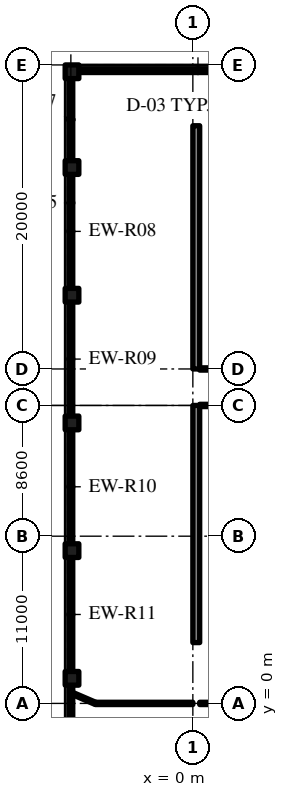
"""IFC4 building model, lengths in metres.
Left out: names, types, materials, properties, quantities, classifications, styles, units other than length and angle.
Written with IfcOpenShell. Run it as: python <this file> out.ifc"""

import sys

from ifc_helpers import new_model, si_unit, direction, frame, frame_2d, origin, origin_2d, place, context, subcontext, project, spatial, rectangle, extrude, source, transform, mapped, element, fill, save


model = new_model("IFC4")
c1 = context("Model", 3, precision=1e-05, world=origin(), true_north=direction((0.0, 1.0)))
c2 = subcontext(c1, "Body", "Model", "MODEL_VIEW")
j1 = project(units=[si_unit("LENGTHUNIT", "METRE"), si_unit("PLANEANGLEUNIT", "RADIAN")], contexts=[c1])
p1 = place(None, origin())
s1 = spatial("IfcSite", under=j1, at=p1, CompositionType="ELEMENT")
p2 = place(p1, origin())
s2 = spatial("IfcBuilding", under=s1, at=p2, CompositionType="ELEMENT")
p3 = place(p2, origin())
s3 = spatial("IfcBuildingStorey", under=s2, at=p3, CompositionType="ELEMENT", Elevation=0.0)
m1 = source(origin(), c2, "Body", "SweptSolid", [
    extrude(rectangle(XDim=15.6, YDim=0.45, at=frame_2d((7.8, 0.0))), origin(), (0.0, 0.0, 1.0), 5.72),
])
p4 = place(p3, frame((0.225, 4.0, 0.0), z_axis=(0.0, 0.0, 1.0), x_axis=(0.0, 1.0, 0.0)))
e1 = element("IfcWall", 1, at=p4, inside=s3, PredefinedType="SHEAR", context=c2, shape_type="MappedRepresentation", body=[
    mapped(m1, transform((0.0, 0.0, 0.0), scale=1.0)),
])
m2 = source(origin(), c2, "Body", "SweptSolid", [
    extrude(rectangle(XDim=16.0, YDim=0.45, at=frame_2d((8.0, 0.0))), origin(), (0.0, 0.0, 1.0), 5.72),
])
p5 = place(p3, frame((0.225, 22.0, 0.0), z_axis=(0.0, 0.0, 1.0), x_axis=(0.0, 1.0, 0.0)))
e2 = element("IfcWall", 2, at=p5, inside=s3, PredefinedType="SHEAR", context=c2, shape_type="MappedRepresentation", body=[
    mapped(m2, transform((0.0, 0.0, 0.0), scale=1.0)),
])
m3 = source(origin(), c2, "Body", "SweptSolid", [
    extrude(rectangle(XDim=0.9, YDim=0.9, at=origin_2d()), origin(), (0.0, 0.0, 1.0), 5.72),
])
for number, where, z_axis, x_axis in (
    (3, (-7.95, 1.65, 0.0), (0.0, 0.0, 1.0), (1.0, 0.0, 0.0)),
    (4, (-7.95, 10.05, 0.0), (0.0, 0.0, 1.0), (1.0, 0.0, 0.0)),
    (5, (-7.95, 18.45, 0.0), (0.0, 0.0, 1.0), (1.0, 0.0, 0.0)),
    (6, (-7.95, 26.85, 0.0), (0.0, 0.0, 1.0), (1.0, 0.0, 0.0)),
    (7, (-7.95, 35.25, 0.0), (0.0, 0.0, 1.0), (1.0, 0.0, 0.0)),
    (8, (-7.95, 41.55, 0.0), (0.0, 0.0, 1.0), (1.0, 0.0, 0.0)),
):
    element("IfcColumn", number, at=place(p3, frame(where, z_axis=z_axis, x_axis=x_axis)), inside=s3, PredefinedType="COLUMN", context=c2, shape_type="MappedRepresentation", body=[
        mapped(m3, transform((0.0, 0.0, 0.0), scale=1.0)),
    ])
m4 = source(origin(), c2, "Body", "SweptSolid", [
    extrude(rectangle(XDim=15.675, YDim=0.25, at=frame_2d((7.837, 0.0))), origin(), (0.0, 0.0, 1.0), 4.97),
])
p6 = place(p3, frame((8.175, 41.625, 0.0), z_axis=(0.0, 0.0, 1.0), x_axis=(-1.0, 0.0, 0.0)))
e9 = element("IfcWall", 9, at=p6, inside=s3, PredefinedType="SOLIDWALL", context=c2, shape_type="MappedRepresentation", body=[
    mapped(m4, transform((0.0, 0.0, 0.0), scale=1.0)),
])
m5 = source(origin(), c2, "Body", "SweptSolid", [
    extrude(rectangle(XDim=1.5, YDim=1.5, at=frame_2d((0.75, 0.75))), frame((0.0, 0.135, 0.0), z_axis=(0.0, -1.0, 0.0), x_axis=(1.0, 0.0, 0.0)), (0.0, 0.0, 1.0), 0.27),
])
p7 = place(p6, frame((1.209, 0.0, 0.9)))
e10 = element("IfcOpeningElement", 10, at=p7, cuts=e9, PredefinedType="OPENING", context=c2, shape_type="MappedRepresentation", body=[
    mapped(m5, transform((0.0, 0.0, 0.0), scale=1.0)),
])
p8 = place(p6, frame((5.128, 0.0, 0.9)))
e11 = element("IfcOpeningElement", 11, at=p8, cuts=e9, PredefinedType="OPENING", context=c2, shape_type="MappedRepresentation", body=[
    mapped(m5, transform((0.0, 0.0, 0.0), scale=1.0)),
])
p9 = place(p6, frame((9.047, 0.0, 0.9)))
e12 = element("IfcOpeningElement", 12, at=p9, cuts=e9, PredefinedType="OPENING", context=c2, shape_type="MappedRepresentation", body=[
    mapped(m5, transform((0.0, 0.0, 0.0), scale=1.0)),
])
p10 = place(p6, frame((12.966, 0.0, 0.9)))
e13 = element("IfcOpeningElement", 13, at=p10, cuts=e9, PredefinedType="OPENING", context=c2, shape_type="MappedRepresentation", body=[
    mapped(m5, transform((0.0, 0.0, 0.0), scale=1.0)),
])
m6 = source(origin(), c2, "Body", "SweptSolid", [
    extrude(rectangle(XDim=5.4, YDim=0.25, at=frame_2d((2.7, 0.0))), origin(), (0.0, 0.0, 1.0), 4.72),
])
p11 = place(p3, frame((-8.025, 41.1, 0.0), z_axis=(0.0, 0.0, 1.0), x_axis=(0.0, -1.0, 0.0)))
e14 = element("IfcWall", 14, at=p11, inside=s3, PredefinedType="SOLIDWALL", context=c2, shape_type="MappedRepresentation", body=[
    mapped(m6, transform((0.0, 0.0, 0.0), scale=1.0)),
])
m7 = source(origin(), c2, "Body", "SweptSolid", [
    extrude(rectangle(XDim=2.4, YDim=3.0, at=frame_2d((1.2, 1.5))), frame((0.0, 0.135, 0.0), z_axis=(0.0, -1.0, 0.0), x_axis=(1.0, 0.0, 0.0)), (0.0, 0.0, 1.0), 0.27),
])
p12 = place(p11, frame((1.5, 0.0, 0.2)))
e15 = element("IfcOpeningElement", 15, at=p12, cuts=e14, PredefinedType="OPENING", context=c2, shape_type="MappedRepresentation", body=[
    mapped(m7, transform((0.0, 0.0, 0.0), scale=1.0)),
])
m8 = source(origin(), c2, "Body", "SweptSolid", [
    extrude(rectangle(XDim=7.5, YDim=0.25, at=frame_2d((3.75, 0.0))), origin(), (0.0, 0.0, 1.0), 4.72),
])
p13 = place(p3, frame((-8.025, 34.8, 0.0), z_axis=(0.0, 0.0, 1.0), x_axis=(0.0, -1.0, 0.0)))
e16 = element("IfcWall", 16, at=p13, inside=s3, PredefinedType="SOLIDWALL", context=c2, shape_type="MappedRepresentation", body=[
    mapped(m8, transform((0.0, 0.0, 0.0), scale=1.0)),
])
p14 = place(p13, frame((0.675, 0.0, 0.2)))
e17 = element("IfcOpeningElement", 17, at=p14, cuts=e16, PredefinedType="OPENING", context=c2, shape_type="MappedRepresentation", body=[
    mapped(m7, transform((0.0, 0.0, 0.0), scale=1.0)),
])
p15 = place(p13, frame((4.425, 0.0, 0.2)))
e18 = element("IfcOpeningElement", 18, at=p15, cuts=e16, PredefinedType="OPENING", context=c2, shape_type="MappedRepresentation", body=[
    mapped(m7, transform((0.0, 0.0, 0.0), scale=1.0)),
])
p16 = place(p3, frame((-8.025, 26.4, 0.0), z_axis=(0.0, 0.0, 1.0), x_axis=(0.0, -1.0, 0.0)))
e19 = element("IfcWall", 19, at=p16, inside=s3, PredefinedType="SOLIDWALL", context=c2, shape_type="MappedRepresentation", body=[
    mapped(m8, transform((0.0, 0.0, 0.0), scale=1.0)),
])
p17 = place(p16, frame((0.675, 0.0, 0.2)))
e20 = element("IfcOpeningElement", 20, at=p17, cuts=e19, PredefinedType="OPENING", context=c2, shape_type="MappedRepresentation", body=[
    mapped(m7, transform((0.0, 0.0, 0.0), scale=1.0)),
])
p18 = place(p16, frame((4.425, 0.0, 0.2)))
e21 = element("IfcOpeningElement", 21, at=p18, cuts=e19, PredefinedType="OPENING", context=c2, shape_type="MappedRepresentation", body=[
    mapped(m7, transform((0.0, 0.0, 0.0), scale=1.0)),
])
p19 = place(p3, frame((-8.025, 18.0, 0.0), z_axis=(0.0, 0.0, 1.0), x_axis=(0.0, -1.0, 0.0)))
e22 = element("IfcWall", 22, at=p19, inside=s3, PredefinedType="SOLIDWALL", context=c2, shape_type="MappedRepresentation", body=[
    mapped(m8, transform((0.0, 0.0, 0.0), scale=1.0)),
])
p20 = place(p19, frame((0.675, 0.0, 0.2)))
e23 = element("IfcOpeningElement", 23, at=p20, cuts=e22, PredefinedType="OPENING", context=c2, shape_type="MappedRepresentation", body=[
    mapped(m7, transform((0.0, 0.0, 0.0), scale=1.0)),
])
p21 = place(p19, frame((4.425, 0.0, 0.2)))
e24 = element("IfcOpeningElement", 24, at=p21, cuts=e22, PredefinedType="OPENING", context=c2, shape_type="MappedRepresentation", body=[
    mapped(m7, transform((0.0, 0.0, 0.0), scale=1.0)),
])
p22 = place(p3, frame((-8.025, 9.6, 0.0), z_axis=(0.0, 0.0, 1.0), x_axis=(0.0, -1.0, 0.0)))
e25 = element("IfcWall", 25, at=p22, inside=s3, PredefinedType="SOLIDWALL", context=c2, shape_type="MappedRepresentation", body=[
    mapped(m8, transform((0.0, 0.0, 0.0), scale=1.0)),
])
p23 = place(p22, frame((0.675, 0.0, 0.2)))
e26 = element("IfcOpeningElement", 26, at=p23, cuts=e25, PredefinedType="OPENING", context=c2, shape_type="MappedRepresentation", body=[
    mapped(m7, transform((0.0, 0.0, 0.0), scale=1.0)),
])
p24 = place(p22, frame((4.425, 0.0, 0.2)))
e27 = element("IfcOpeningElement", 27, at=p24, cuts=e25, PredefinedType="OPENING", context=c2, shape_type="MappedRepresentation", body=[
    mapped(m7, transform((0.0, 0.0, 0.0), scale=1.0)),
])
p25 = place(p3, frame((-8.025, 1.2, 0.0), z_axis=(0.0, 0.0, 1.0), x_axis=(0.0, -1.0, 0.0)))
e28 = element("IfcWall", 28, at=p25, inside=s3, PredefinedType="SOLIDWALL", context=c2, shape_type="MappedRepresentation", body=[
    mapped(m8, transform((0.0, 0.0, 0.0), scale=1.0)),
])
p26 = place(p25, frame((0.675, 0.0, 0.2)))
e29 = element("IfcOpeningElement", 29, at=p26, cuts=e28, PredefinedType="OPENING", context=c2, shape_type="MappedRepresentation", body=[
    mapped(m7, transform((0.0, 0.0, 0.0), scale=1.0)),
])
p27 = place(p25, frame((4.425, 0.0, 0.2)))
e30 = element("IfcOpeningElement", 30, at=p27, cuts=e28, PredefinedType="OPENING", context=c2, shape_type="MappedRepresentation", body=[
    mapped(m7, transform((0.0, 0.0, 0.0), scale=1.0)),
])
m9 = source(origin(), c2, "Body", "SweptSolid", [
    extrude(rectangle(XDim=7.725, YDim=0.15, at=frame_2d((3.863, 0.0))), origin(), (0.0, 0.0, 1.0), 5.02),
])
p28 = place(p3, frame((0.45, 19.6, 0.0), z_axis=(0.0, 0.0, 1.0), x_axis=(1.0, 0.0, 0.0)))
e31 = element("IfcWall", 31, at=p28, inside=s3, PredefinedType="PARTITIONING", context=c2, shape_type="MappedRepresentation", body=[
    mapped(m9, transform((0.0, 0.0, 0.0), scale=1.0)),
])
m10 = source(origin(), c2, "Body", "SweptSolid", [
    extrude(rectangle(XDim=1.8, YDim=2.1, at=frame_2d((0.9, 1.05))), frame((0.0, 0.085, 0.0), z_axis=(0.0, -1.0, 0.0), x_axis=(1.0, 0.0, 0.0)), (0.0, 0.0, 1.0), 0.17),
])
p29 = place(p28, frame((2.962, 0.0, 0.0)))
e32 = element("IfcOpeningElement", 32, at=p29, cuts=e31, PredefinedType="OPENING", context=c2, shape_type="MappedRepresentation", body=[
    mapped(m10, transform((0.0, 0.0, 0.0), scale=1.0)),
])
m11 = source(origin(), c2, "Body", "SweptSolid", [
    extrude(rectangle(XDim=7.725, YDim=0.15, at=frame_2d((3.863, 0.0))), origin(), (0.0, 0.0, 1.0), 5.72),
])
p30 = place(p3, frame((0.45, 0.0, 0.0), z_axis=(0.0, 0.0, 1.0), x_axis=(1.0, 0.0, 0.0)))
e33 = element("IfcWall", 33, at=p30, inside=s3, PredefinedType="PARTITIONING", context=c2, shape_type="MappedRepresentation", body=[
    mapped(m11, transform((0.0, 0.0, 0.0), scale=1.0)),
])
m12 = source(origin(), c2, "Body", "SweptSolid", [
    extrude(rectangle(XDim=6.4, YDim=0.15, at=frame_2d((3.2, 0.0))), origin(), (0.0, 0.0, 1.0), 5.72),
])
p31 = place(p3, frame((-6.4, 0.0, 0.0), z_axis=(0.0, 0.0, 1.0), x_axis=(1.0, 0.0, 0.0)))
e34 = element("IfcWall", 34, at=p31, inside=s3, PredefinedType="PARTITIONING", context=c2, shape_type="MappedRepresentation", body=[
    mapped(m12, transform((0.0, 0.0, 0.0), scale=1.0)),
])
p32 = place(p3, frame((0.45, 22.0, 0.0), z_axis=(0.0, 0.0, 1.0), x_axis=(1.0, 0.0, 0.0)))
e35 = element("IfcWall", 35, at=p32, inside=s3, PredefinedType="PARTITIONING", context=c2, shape_type="MappedRepresentation", body=[
    mapped(m9, transform((0.0, 0.0, 0.0), scale=1.0)),
])
p33 = place(p32, frame((2.962, 0.0, 0.0)))
e36 = element("IfcOpeningElement", 36, at=p33, cuts=e35, PredefinedType="OPENING", context=c2, shape_type="MappedRepresentation", body=[
    mapped(m10, transform((0.0, 0.0, 0.0), scale=1.0)),
])
m13 = source(origin(), c2, "Body", "SweptSolid", [
    extrude(rectangle(XDim=1.633, YDim=0.15, at=frame_2d((0.816, 0.0))), origin(), (0.0, 0.0, 1.0), 5.72),
])
p34 = place(p3, frame((-7.9, 0.645, 0.0), z_axis=(0.0, 0.0, 1.0), x_axis=(0.918664846596, -0.395037845818, 0.0)))
e37 = element("IfcWall", 37, at=p34, inside=s3, PredefinedType="PARTITIONING", context=c2, shape_type="MappedRepresentation", body=[
    mapped(m13, transform((0.0, 0.0, 0.0), scale=1.0)),
])
m14 = source(origin(), c2, "Body", "SweptSolid", [
    extrude(rectangle(XDim=1.5, YDim=1.5, at=frame_2d((0.75, 0.75))), frame((0.0, 0.03, 0.0), z_axis=(0.0, -1.0, 0.0), x_axis=(1.0, 0.0, 0.0)), (0.0, 0.0, 1.0), 0.06),
])
p35 = place(p9, origin())
e38 = element("IfcWindow", 38, at=p35, inside=s3, PartitioningType="SINGLE_PANEL", PredefinedType="WINDOW", context=c2, shape_type="MappedRepresentation", body=[
    mapped(m14, transform((0.0, 0.0, 0.0), scale=1.0)),
])
fill(e12, e38)
p36 = place(p10, origin())
e39 = element("IfcWindow", 39, at=p36, inside=s3, PartitioningType="SINGLE_PANEL", PredefinedType="WINDOW", context=c2, shape_type="MappedRepresentation", body=[
    mapped(m14, transform((0.0, 0.0, 0.0), scale=1.0)),
])
fill(e13, e39)
m15 = source(origin(), c2, "Body", "SweptSolid", [
    extrude(rectangle(XDim=2.4, YDim=3.0, at=frame_2d((1.2, 1.5))), frame((0.0, 0.03, 0.0), z_axis=(0.0, -1.0, 0.0), x_axis=(1.0, 0.0, 0.0)), (0.0, 0.0, 1.0), 0.06),
])
p37 = place(p12, origin())
e40 = element("IfcWindow", 40, at=p37, inside=s3, PartitioningType="SINGLE_PANEL", PredefinedType="WINDOW", context=c2, shape_type="MappedRepresentation", body=[
    mapped(m15, transform((0.0, 0.0, 0.0), scale=1.0)),
])
fill(e15, e40)
p38 = place(p14, origin())
e41 = element("IfcWindow", 41, at=p38, inside=s3, PartitioningType="SINGLE_PANEL", PredefinedType="WINDOW", context=c2, shape_type="MappedRepresentation", body=[
    mapped(m15, transform((0.0, 0.0, 0.0), scale=1.0)),
])
fill(e17, e41)
p39 = place(p15, origin())
e42 = element("IfcWindow", 42, at=p39, inside=s3, PartitioningType="SINGLE_PANEL", PredefinedType="WINDOW", context=c2, shape_type="MappedRepresentation", body=[
    mapped(m15, transform((0.0, 0.0, 0.0), scale=1.0)),
])
fill(e18, e42)
p40 = place(p17, origin())
e43 = element("IfcWindow", 43, at=p40, inside=s3, PartitioningType="SINGLE_PANEL", PredefinedType="WINDOW", context=c2, shape_type="MappedRepresentation", body=[
    mapped(m15, transform((0.0, 0.0, 0.0), scale=1.0)),
])
fill(e20, e43)
p41 = place(p18, origin())
e44 = element("IfcWindow", 44, at=p41, inside=s3, PartitioningType="SINGLE_PANEL", PredefinedType="WINDOW", context=c2, shape_type="MappedRepresentation", body=[
    mapped(m15, transform((0.0, 0.0, 0.0), scale=1.0)),
])
fill(e21, e44)
p42 = place(p20, origin())
e45 = element("IfcWindow", 45, at=p42, inside=s3, PartitioningType="SINGLE_PANEL", PredefinedType="WINDOW", context=c2, shape_type="MappedRepresentation", body=[
    mapped(m15, transform((0.0, 0.0, 0.0), scale=1.0)),
])
fill(e23, e45)
p43 = place(p21, origin())
e46 = element("IfcWindow", 46, at=p43, inside=s3, PartitioningType="SINGLE_PANEL", PredefinedType="WINDOW", context=c2, shape_type="MappedRepresentation", body=[
    mapped(m15, transform((0.0, 0.0, 0.0), scale=1.0)),
])
fill(e24, e46)
p44 = place(p23, origin())
e47 = element("IfcWindow", 47, at=p44, inside=s3, PartitioningType="SINGLE_PANEL", PredefinedType="WINDOW", context=c2, shape_type="MappedRepresentation", body=[
    mapped(m15, transform((0.0, 0.0, 0.0), scale=1.0)),
])
fill(e26, e47)
p45 = place(p24, origin())
e48 = element("IfcWindow", 48, at=p45, inside=s3, PartitioningType="SINGLE_PANEL", PredefinedType="WINDOW", context=c2, shape_type="MappedRepresentation", body=[
    mapped(m15, transform((0.0, 0.0, 0.0), scale=1.0)),
])
fill(e27, e48)
p46 = place(p26, origin())
e49 = element("IfcWindow", 49, at=p46, inside=s3, PartitioningType="SINGLE_PANEL", PredefinedType="WINDOW", context=c2, shape_type="MappedRepresentation", body=[
    mapped(m15, transform((0.0, 0.0, 0.0), scale=1.0)),
])
fill(e29, e49)
save(model, sys.argv[1])
